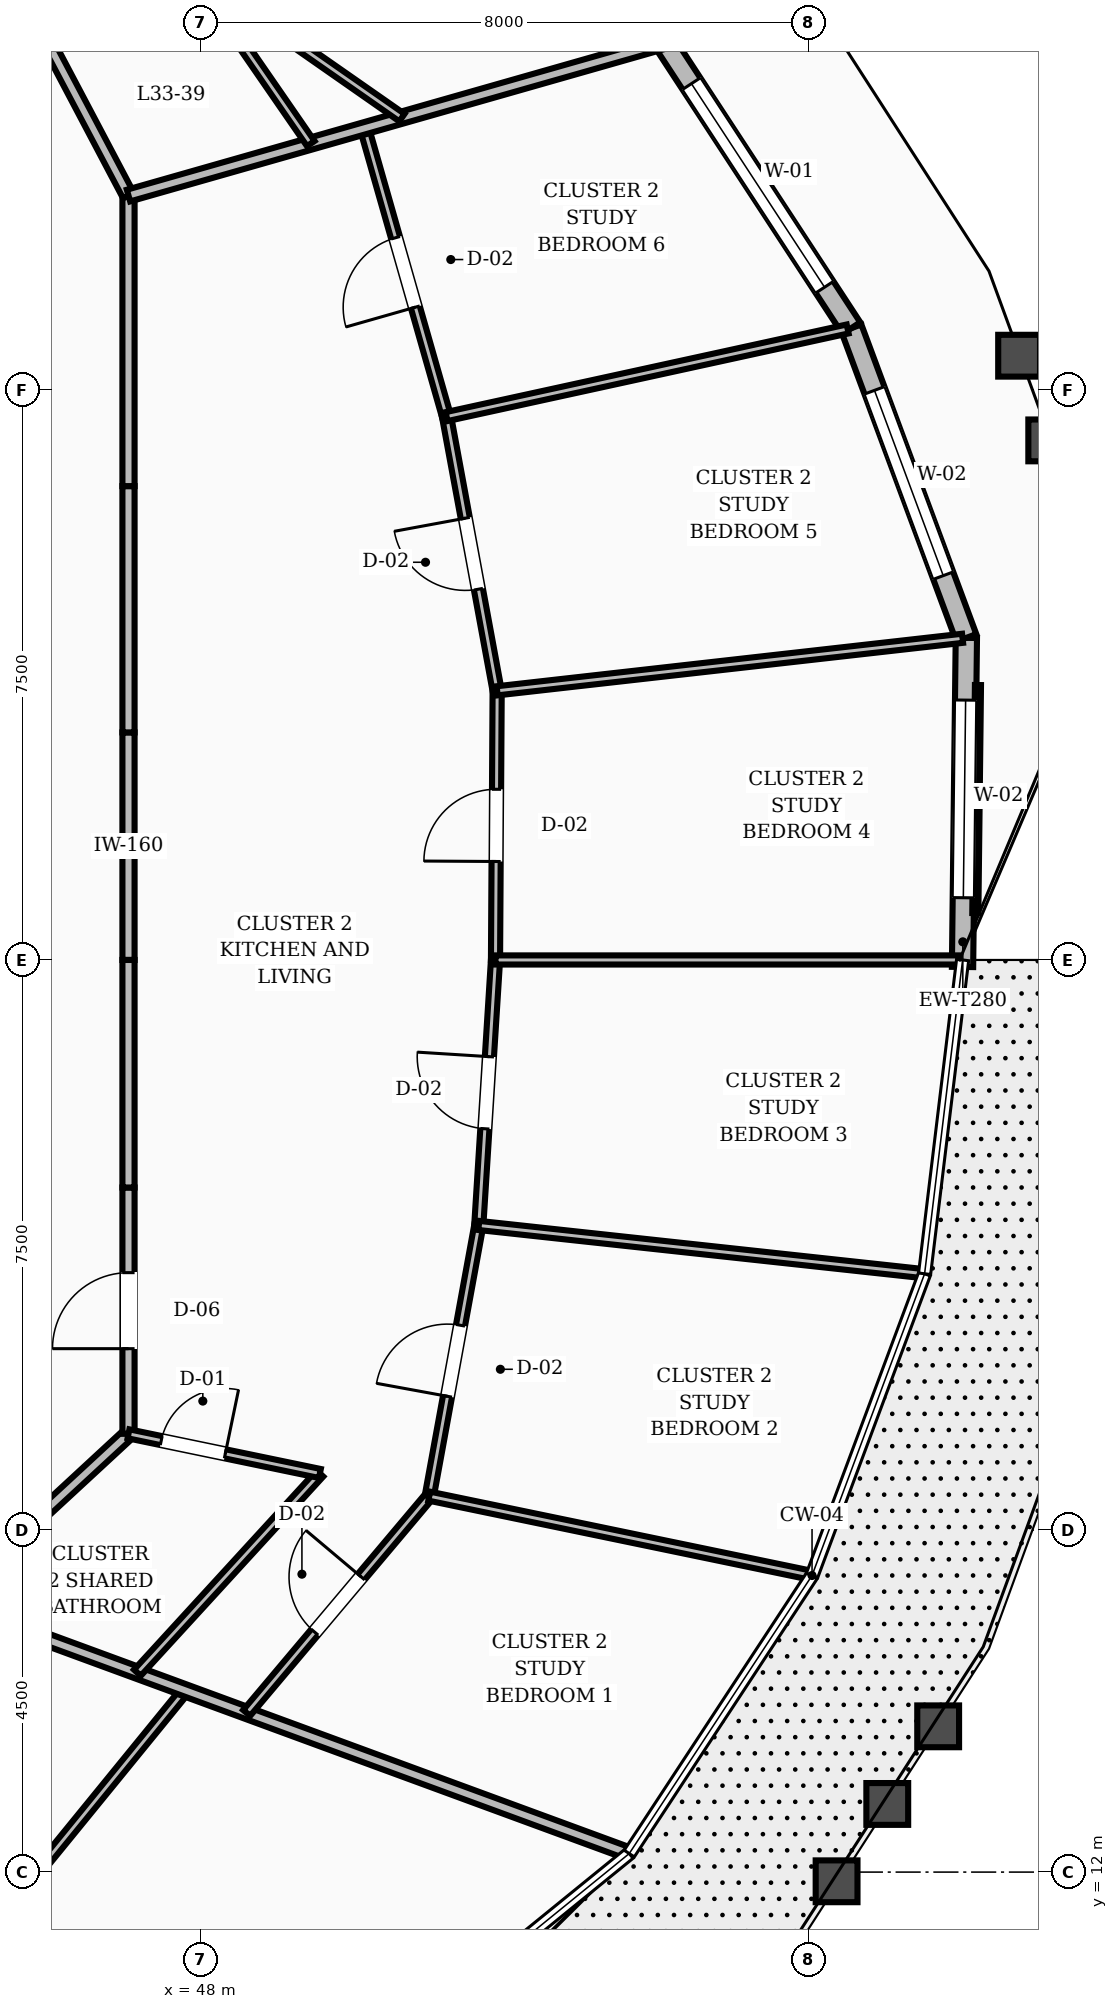
"""IFC4 building model, lengths in metres.
Left out: names, types, materials, properties, quantities, classifications, styles, units other than length and angle.
Written with IfcOpenShell. Run it as: python <this file> out.ifc"""

import sys

from ifc_helpers import new_model, si_unit, direction, frame, frame_2d, origin, place, context, subcontext, project, spatial, rectangle, extrude, element, fill, save


model = new_model("IFC4")
c1 = context("Model", 3, precision=1e-05, world=origin(), true_north=direction((0.0, 1.0)))
c2 = subcontext(c1, "Body", "Model", "MODEL_VIEW")
j1 = project(units=[si_unit("LENGTHUNIT", "METRE"), si_unit("PLANEANGLEUNIT", "RADIAN")], contexts=[c1])
p1 = place(None, origin())
s1 = spatial("IfcSite", under=j1, at=p1, CompositionType="ELEMENT")
p2 = place(p1, origin())
s2 = spatial("IfcBuilding", under=s1, at=p2, CompositionType="ELEMENT")
p3 = place(p2, frame((0.0, 0.0, 131.6)))
s3 = spatial("IfcBuildingStorey", under=s2, at=p3, CompositionType="ELEMENT", Elevation=131.6)
p4 = place(p3, frame((58.023, 23.908, 0.0), z_axis=(0.0, 0.0, 1.0), x_axis=(0.011615321034, 0.999932539883, 0.0)))
e1 = element("IfcWall", 1, at=p4, inside=s3, PredefinedType="STANDARD", context=c2, shape_type="SweptSolid", body=[
    extrude(rectangle(XDim=4.33, YDim=0.28, at=frame_2d((2.165, 0.0))), origin(), (0.0, 0.0, 1.0), 2.82),
])
p5 = place(p4, frame((0.911, 0.0, 0.8)))
e2 = element("IfcOpeningElement", 2, at=p5, cuts=e1, PredefinedType="OPENING", context=c2, shape_type="SweptSolid", body=[
    extrude(rectangle(XDim=2.6, YDim=1.65, at=frame_2d((1.3, 0.825))), frame((0.0, 0.15, 0.0), z_axis=(0.0, -1.0, 0.0), x_axis=(1.0, 0.0, 0.0)), (0.0, 0.0, 1.0), 0.3),
])
p6 = place(p3, frame((58.073, 28.238, 0.0), z_axis=(0.0, 0.0, 1.0), x_axis=(-0.348099086438, 0.937457746259, 0.0)))
e3 = element("IfcWall", 3, at=p6, inside=s3, PredefinedType="STANDARD", context=c2, shape_type="SweptSolid", body=[
    extrude(rectangle(XDim=4.346, YDim=0.28, at=frame_2d((2.173, 0.0))), origin(), (0.0, 0.0, 1.0), 2.82),
])
p7 = place(p6, frame((0.873, 0.0, 0.8)))
e4 = element("IfcOpeningElement", 4, at=p7, cuts=e3, PredefinedType="OPENING", context=c2, shape_type="SweptSolid", body=[
    extrude(rectangle(XDim=2.6, YDim=1.65, at=frame_2d((1.3, 0.825))), frame((0.0, 0.15, 0.0), z_axis=(0.0, -1.0, 0.0), x_axis=(1.0, 0.0, 0.0)), (0.0, 0.0, 1.0), 0.3),
])
p8 = place(p3, frame((56.56, 32.312, 0.0), z_axis=(0.0, 0.0, 1.0), x_axis=(-0.547422319482, 0.836856501518, 0.0)))
e5 = element("IfcWall", 5, at=p8, inside=s3, PredefinedType="STANDARD", context=c2, shape_type="SweptSolid", body=[
    extrude(rectangle(XDim=4.488, YDim=0.28, at=frame_2d((2.244, 0.0))), origin(), (0.0, 0.0, 1.0), 2.82),
])
p9 = place(p8, frame((0.644, 0.0, 0.8)))
e6 = element("IfcOpeningElement", 6, at=p9, cuts=e5, PredefinedType="OPENING", context=c2, shape_type="SweptSolid", body=[
    extrude(rectangle(XDim=3.2, YDim=1.65, at=frame_2d((1.6, 0.825))), frame((0.0, 0.15, 0.0), z_axis=(0.0, -1.0, 0.0), x_axis=(1.0, 0.0, 0.0)), (0.0, 0.0, 1.0), 0.3),
])
p10 = place(p3, frame((47.05, 24.0, 0.0), z_axis=(0.0, 0.0, 1.0), x_axis=(0.0, 1.0, 0.0)))
e7 = element("IfcWall", 7, at=p10, inside=s3, PredefinedType="SOLIDWALL", context=c2, shape_type="SweptSolid", body=[
    extrude(rectangle(XDim=2.994, YDim=0.16, at=frame_2d((1.497, 0.0))), origin(), (0.0, 0.0, 1.0), 2.8),
])
p11 = place(p3, frame((47.05, 26.994, 0.0), z_axis=(0.0, 0.0, 1.0), x_axis=(0.0, 1.0, 0.0)))
e8 = element("IfcWall", 8, at=p11, inside=s3, PredefinedType="SOLIDWALL", context=c2, shape_type="SweptSolid", body=[
    extrude(rectangle(XDim=3.24, YDim=0.16, at=frame_2d((1.62, 0.0))), origin(), (0.0, 0.0, 1.0), 2.8),
])
p12 = place(p3, frame((47.05, 30.234, 0.0), z_axis=(0.0, 0.0, 1.0), x_axis=(0.0, 1.0, 0.0)))
e9 = element("IfcWall", 9, at=p12, inside=s3, PredefinedType="SOLIDWALL", context=c2, shape_type="SweptSolid", body=[
    extrude(rectangle(XDim=3.822, YDim=0.16, at=frame_2d((1.911, 0.0))), origin(), (0.0, 0.0, 1.0), 2.8),
])
p13 = place(p3, frame((47.05, 34.056, 0.0), z_axis=(0.0, 0.0, 1.0), x_axis=(-0.466737093093, 0.884396113702, 0.0)))
e10 = element("IfcWall", 10, at=p13, inside=s3, PredefinedType="SOLIDWALL", context=c2, shape_type="SweptSolid", body=[
    extrude(rectangle(XDim=3.696, YDim=0.16, at=frame_2d((1.848, 0.0))), origin(), (0.0, 0.0, 1.0), 2.8),
])
p14 = place(p3, frame((44.65, 15.548, 0.0), z_axis=(0.0, 0.0, 1.0), x_axis=(0.734347936521, 0.678773237633, 0.0)))
e11 = element("IfcWall", 11, at=p14, inside=s3, PredefinedType="SOLIDWALL", context=c2, shape_type="SweptSolid", body=[
    extrude(rectangle(XDim=3.268, YDim=0.16, at=frame_2d((1.634, 0.0))), origin(), (0.0, 0.0, 1.0), 2.8),
])
p15 = place(p3, frame((47.05, 17.766, 0.0), z_axis=(0.0, 0.0, 1.0), x_axis=(0.0, 1.0, 0.0)))
e12 = element("IfcWall", 12, at=p15, inside=s3, PredefinedType="SOLIDWALL", context=c2, shape_type="SweptSolid", body=[
    extrude(rectangle(XDim=3.24, YDim=0.16, at=frame_2d((1.62, 0.0))), origin(), (0.0, 0.0, 1.0), 2.8),
])
p16 = place(p15, frame((1.12, 0.0, 0.0)))
e13 = element("IfcOpeningElement", 13, at=p16, cuts=e12, PredefinedType="OPENING", context=c2, shape_type="SweptSolid", body=[
    extrude(rectangle(XDim=1.0, YDim=2.1, at=frame_2d((0.5, 1.05))), frame((0.0, 0.09, 0.0), z_axis=(0.0, -1.0, 0.0), x_axis=(1.0, 0.0, 0.0)), (0.0, 0.0, 1.0), 0.18),
])
p17 = place(p3, frame((47.05, 21.006, 0.0), z_axis=(0.0, 0.0, 1.0), x_axis=(0.0, 1.0, 0.0)))
e14 = element("IfcWall", 14, at=p17, inside=s3, PredefinedType="SOLIDWALL", context=c2, shape_type="SweptSolid", body=[
    extrude(rectangle(XDim=2.994, YDim=0.16, at=frame_2d((1.497, 0.0))), origin(), (0.0, 0.0, 1.0), 2.8),
])
p18 = place(p3, frame((45.558, 11.646, 0.0), z_axis=(0.0, 0.0, 1.0), x_axis=(0.631780340891, 0.775147470397, 0.0)))
e15 = element("IfcWall", 15, at=p18, inside=s3, PredefinedType="PARTITIONING", context=c2, shape_type="SweptSolid", body=[
    extrude(rectangle(XDim=3.542, YDim=0.12, at=frame_2d((1.771, 0.0))), origin(), (0.0, 0.0, 1.0), 2.8),
])
p19 = place(p3, frame((44.65, 15.548, 0.0), z_axis=(0.0, 0.0, 1.0), x_axis=(0.938597960156, -0.345012853661, 0.0)))
e16 = element("IfcWall", 16, at=p19, inside=s3, PredefinedType="SOLIDWALL", context=c2, shape_type="SweptSolid", body=[
    extrude(rectangle(XDim=9.526, YDim=0.16, at=frame_2d((4.763, 0.0))), origin(), (0.0, 0.0, 1.0), 2.8),
])
p20 = place(p3, frame((47.167, 14.623, 0.0), z_axis=(0.0, 0.0, 1.0), x_axis=(0.675494490503, 0.737365033956, 0.0)))
e17 = element("IfcWall", 17, at=p20, inside=s3, PredefinedType="PARTITIONING", context=c2, shape_type="SweptSolid", body=[
    extrude(rectangle(XDim=3.555, YDim=0.12, at=frame_2d((1.778, 0.0))), origin(), (0.0, 0.0, 1.0), 2.8),
])
p21 = place(p3, frame((47.05, 17.766, 0.0), z_axis=(0.0, 0.0, 1.0), x_axis=(0.979183706755, -0.202976029188, 0.0)))
e18 = element("IfcWall", 18, at=p21, inside=s3, PredefinedType="PARTITIONING", context=c2, shape_type="SweptSolid", body=[
    extrude(rectangle(XDim=2.572, YDim=0.12, at=frame_2d((1.286, 0.0))), origin(), (0.0, 0.0, 1.0), 2.8),
])
p22 = place(p21, frame((0.44, 0.0, 0.0)))
e19 = element("IfcOpeningElement", 19, at=p22, cuts=e18, PredefinedType="OPENING", context=c2, shape_type="SweptSolid", body=[
    extrude(rectangle(XDim=0.86, YDim=2.1, at=frame_2d((0.43, 1.05))), frame((0.0, 0.07, 0.0), z_axis=(0.0, -1.0, 0.0), x_axis=(1.0, 0.0, 0.0)), (0.0, 0.0, 1.0), 0.14),
])
p23 = place(p3, frame((48.605, 14.094, 0.0), z_axis=(0.0, 0.0, 1.0), x_axis=(0.644194213793, 0.764861958078, 0.0)))
e20 = element("IfcWall", 20, at=p23, inside=s3, PredefinedType="PARTITIONING", context=c2, shape_type="SweptSolid", body=[
    extrude(rectangle(XDim=3.729, YDim=0.12, at=frame_2d((1.864, 0.0))), origin(), (0.0, 0.0, 1.0), 2.8),
])
p24 = place(p23, frame((1.389, 0.0, 0.0)))
e21 = element("IfcOpeningElement", 21, at=p24, cuts=e20, PredefinedType="OPENING", context=c2, shape_type="SweptSolid", body=[
    extrude(rectangle(XDim=0.95, YDim=2.1, at=frame_2d((0.475, 1.05))), frame((0.0, 0.07, 0.0), z_axis=(0.0, -1.0, 0.0), x_axis=(1.0, 0.0, 0.0)), (0.0, 0.0, 1.0), 0.14),
])
p25 = place(p3, frame((51.007, 16.946, 0.0), z_axis=(0.0, 0.0, 1.0), x_axis=(0.179995103125, 0.983667506249, 0.0)))
e22 = element("IfcWall", 22, at=p25, inside=s3, PredefinedType="PARTITIONING", context=c2, shape_type="SweptSolid", body=[
    extrude(rectangle(XDim=3.62, YDim=0.12, at=frame_2d((1.81, 0.0))), origin(), (0.0, 0.0, 1.0), 2.8),
])
p26 = place(p25, frame((1.335, 0.0, 0.0)))
e23 = element("IfcOpeningElement", 23, at=p26, cuts=e22, PredefinedType="OPENING", context=c2, shape_type="SweptSolid", body=[
    extrude(rectangle(XDim=0.95, YDim=2.1, at=frame_2d((0.475, 1.05))), frame((0.0, 0.07, 0.0), z_axis=(0.0, -1.0, 0.0), x_axis=(1.0, 0.0, 0.0)), (0.0, 0.0, 1.0), 0.14),
])
p27 = place(p3, frame((51.007, 16.946, 0.0), z_axis=(0.0, 0.0, 1.0), x_axis=(0.979186893487, -0.202960655359, 0.0)))
e24 = element("IfcWall", 24, at=p27, inside=s3, PredefinedType="PARTITIONING", context=c2, shape_type="SweptSolid", body=[
    extrude(rectangle(XDim=5.093, YDim=0.12, at=frame_2d((2.546, 0.0))), origin(), (0.0, 0.0, 1.0), 2.8),
])
p28 = place(p3, frame((51.658, 20.507, 0.0), z_axis=(0.0, 0.0, 1.0), x_axis=(0.062851654095, 0.998022880288, 0.0)))
e25 = element("IfcWall", 25, at=p28, inside=s3, PredefinedType="PARTITIONING", context=c2, shape_type="SweptSolid", body=[
    extrude(rectangle(XDim=3.5, YDim=0.12, at=frame_2d((1.75, 0.0))), origin(), (0.0, 0.0, 1.0), 2.8),
])
p29 = place(p28, frame((1.275, 0.0, 0.0)))
e26 = element("IfcOpeningElement", 26, at=p29, cuts=e25, PredefinedType="OPENING", context=c2, shape_type="SweptSolid", body=[
    extrude(rectangle(XDim=0.95, YDim=2.1, at=frame_2d((0.475, 1.05))), frame((0.0, 0.07, 0.0), z_axis=(0.0, -1.0, 0.0), x_axis=(1.0, 0.0, 0.0)), (0.0, 0.0, 1.0), 0.14),
])
p30 = place(p3, frame((51.658, 20.507, 0.0), z_axis=(0.0, 0.0, 1.0), x_axis=(0.994185813814, -0.107678073953, 0.0)))
e27 = element("IfcWall", 27, at=p30, inside=s3, PredefinedType="PARTITIONING", context=c2, shape_type="SweptSolid", body=[
    extrude(rectangle(XDim=5.85, YDim=0.12, at=frame_2d((2.925, 0.0))), origin(), (0.0, 0.0, 1.0), 2.8),
])
p31 = place(p3, frame((51.878, 24.0, 0.0), z_axis=(0.0, 0.0, 1.0), x_axis=(0.006136122757, 0.999981173822, 0.0)))
e28 = element("IfcWall", 28, at=p31, inside=s3, PredefinedType="PARTITIONING", context=c2, shape_type="SweptSolid", body=[
    extrude(rectangle(XDim=3.541, YDim=0.12, at=frame_2d((1.771, 0.0))), origin(), (0.0, 0.0, 1.0), 2.8),
])
p32 = place(p31, frame((1.295, 0.0, 0.0)))
e29 = element("IfcOpeningElement", 29, at=p32, cuts=e28, PredefinedType="OPENING", context=c2, shape_type="SweptSolid", body=[
    extrude(rectangle(XDim=0.95, YDim=2.1, at=frame_2d((0.475, 1.05))), frame((0.0, 0.07, 0.0), z_axis=(0.0, -1.0, 0.0), x_axis=(1.0, 0.0, 0.0)), (0.0, 0.0, 1.0), 0.14),
])
p33 = place(p3, frame((51.878, 24.0, 0.0), z_axis=(0.0, 0.0, 1.0), x_axis=(1.0, 0.0, 0.0)))
e30 = element("IfcWall", 30, at=p33, inside=s3, PredefinedType="PARTITIONING", context=c2, shape_type="SweptSolid", body=[
    extrude(rectangle(XDim=6.095, YDim=0.12, at=frame_2d((3.048, 0.0))), origin(), (0.0, 0.0, 1.0), 2.8),
])
p34 = place(p3, frame((51.9, 27.541, 0.0), z_axis=(0.0, 0.0, 1.0), x_axis=(-0.181502919565, 0.983390405785, 0.0)))
e31 = element("IfcWall", 31, at=p34, inside=s3, PredefinedType="PARTITIONING", context=c2, shape_type="SweptSolid", body=[
    extrude(rectangle(XDim=3.668, YDim=0.12, at=frame_2d((1.834, 0.0))), origin(), (0.0, 0.0, 1.0), 2.8),
])
p35 = place(p34, frame((1.359, 0.0, 0.0)))
e32 = element("IfcOpeningElement", 32, at=p35, cuts=e31, PredefinedType="OPENING", context=c2, shape_type="SweptSolid", body=[
    extrude(rectangle(XDim=0.95, YDim=2.1, at=frame_2d((0.475, 1.05))), frame((0.0, 0.07, 0.0), z_axis=(0.0, -1.0, 0.0), x_axis=(1.0, 0.0, 0.0)), (0.0, 0.0, 1.0), 0.14),
])
p36 = place(p3, frame((51.9, 27.541, 0.0), z_axis=(0.0, 0.0, 1.0), x_axis=(0.993693846481, 0.112127335947, 0.0)))
e33 = element("IfcWall", 33, at=p36, inside=s3, PredefinedType="PARTITIONING", context=c2, shape_type="SweptSolid", body=[
    extrude(rectangle(XDim=6.162, YDim=0.12, at=frame_2d((3.081, 0.0))), origin(), (0.0, 0.0, 1.0), 2.8),
])
p37 = place(p3, frame((51.234, 31.148, 0.0), z_axis=(0.0, 0.0, 1.0), x_axis=(-0.274058783109, 0.961712942307, 0.0)))
e34 = element("IfcWall", 34, at=p37, inside=s3, PredefinedType="PARTITIONING", context=c2, shape_type="SweptSolid", body=[
    extrude(rectangle(XDim=3.944, YDim=0.12, at=frame_2d((1.972, 0.0))), origin(), (0.0, 0.0, 1.0), 2.8),
])
p38 = place(p37, frame((1.497, 0.0, 0.0)))
e35 = element("IfcOpeningElement", 35, at=p38, cuts=e34, PredefinedType="OPENING", context=c2, shape_type="SweptSolid", body=[
    extrude(rectangle(XDim=0.95, YDim=2.1, at=frame_2d((0.475, 1.05))), frame((0.0, 0.07, 0.0), z_axis=(0.0, -1.0, 0.0), x_axis=(1.0, 0.0, 0.0)), (0.0, 0.0, 1.0), 0.14),
])
p39 = place(p3, frame((51.234, 31.148, 0.0), z_axis=(0.0, 0.0, 1.0), x_axis=(0.976938334756, 0.213521638447, 0.0)))
e36 = element("IfcWall", 36, at=p39, inside=s3, PredefinedType="PARTITIONING", context=c2, shape_type="SweptSolid", body=[
    extrude(rectangle(XDim=5.401, YDim=0.12, at=frame_2d((2.701, 0.0))), origin(), (0.0, 0.0, 1.0), 2.8),
])
p40 = place(p3, frame((47.05, 34.056, 0.0), z_axis=(0.0, 0.0, 1.0), x_axis=(0.961667991251, 0.274216473981, 0.0)))
e37 = element("IfcWall", 37, at=p40, inside=s3, PredefinedType="SOLIDWALL", context=c2, shape_type="SweptSolid", body=[
    extrude(rectangle(XDim=7.285, YDim=0.16, at=frame_2d((3.642, 0.0))), origin(), (0.0, 0.0, 1.0), 2.8),
])
p41 = place(p3, frame((49.448, 34.74, 0.0), z_axis=(0.0, 0.0, 1.0), x_axis=(-0.568195659841, 0.822893487723, 0.0)))
e38 = element("IfcWall", 38, at=p41, inside=s3, PredefinedType="PARTITIONING", context=c2, shape_type="SweptSolid", body=[
    extrude(rectangle(XDim=3.982, YDim=0.12, at=frame_2d((1.991, 0.0))), origin(), (0.0, 0.0, 1.0), 2.8),
])
p42 = place(p3, frame((50.647, 35.082, 0.0), z_axis=(0.0, 0.0, 1.0), x_axis=(-0.820068492929, 0.572265381537, 0.0)))
e39 = element("IfcWall", 39, at=p42, inside=s3, PredefinedType="PARTITIONING", context=c2, shape_type="SweptSolid", body=[
    extrude(rectangle(XDim=8.204, YDim=0.12, at=frame_2d((4.102, 0.0))), origin(), (0.0, 0.0, 1.0), 2.8),
])
p43 = place(p42, frame((5.029, 0.0, 0.0)))
e40 = element("IfcOpeningElement", 40, at=p43, cuts=e39, PredefinedType="OPENING", context=c2, shape_type="SweptSolid", body=[
    extrude(rectangle(XDim=0.95, YDim=2.1, at=frame_2d((0.475, 1.05))), frame((0.0, 0.07, 0.0), z_axis=(0.0, -1.0, 0.0), x_axis=(1.0, 0.0, 0.0)), (0.0, 0.0, 1.0), 0.14),
])
p44 = place(p5, origin())
e41 = element("IfcWindow", 41, at=p44, inside=s3, PartitioningType="SINGLE_PANEL", PredefinedType="WINDOW", context=c2, shape_type="SweptSolid", body=[
    extrude(rectangle(XDim=2.6, YDim=1.65, at=frame_2d((1.3, 0.825))), frame((0.0, 0.03, 0.0), z_axis=(0.0, -1.0, 0.0), x_axis=(1.0, 0.0, 0.0)), (0.0, 0.0, 1.0), 0.06),
])
fill(e2, e41)
p45 = place(p7, origin())
e42 = element("IfcWindow", 42, at=p45, inside=s3, PartitioningType="SINGLE_PANEL", PredefinedType="WINDOW", context=c2, shape_type="SweptSolid", body=[
    extrude(rectangle(XDim=2.6, YDim=1.65, at=frame_2d((1.3, 0.825))), frame((0.0, 0.03, 0.0), z_axis=(0.0, -1.0, 0.0), x_axis=(1.0, 0.0, 0.0)), (0.0, 0.0, 1.0), 0.06),
])
fill(e4, e42)
p46 = place(p9, origin())
e43 = element("IfcWindow", 43, at=p46, inside=s3, PartitioningType="SINGLE_PANEL", PredefinedType="WINDOW", context=c2, shape_type="SweptSolid", body=[
    extrude(rectangle(XDim=3.2, YDim=1.65, at=frame_2d((1.6, 0.825))), frame((0.0, 0.03, 0.0), z_axis=(0.0, -1.0, 0.0), x_axis=(1.0, 0.0, 0.0)), (0.0, 0.0, 1.0), 0.06),
])
fill(e6, e43)
p47 = place(p22, origin())
e44 = element("IfcDoor", 44, at=p47, inside=s3, OperationType="SINGLE_SWING_RIGHT", PredefinedType="DOOR", context=c2, shape_type="SweptSolid", body=[
    extrude(rectangle(XDim=0.86, YDim=2.1, at=frame_2d((0.43, 1.05))), frame((0.0, 0.025, 0.0), z_axis=(0.0, -1.0, 0.0), x_axis=(1.0, 0.0, 0.0)), (0.0, 0.0, 1.0), 0.05),
])
fill(e19, e44)
p48 = place(p16, origin())
e45 = element("IfcDoor", 45, at=p48, inside=s3, OperationType="SINGLE_SWING_LEFT", PredefinedType="DOOR", context=c2, shape_type="SweptSolid", body=[
    extrude(rectangle(XDim=1.0, YDim=2.1, at=frame_2d((0.5, 1.05))), frame((0.0, 0.025, 0.0), z_axis=(0.0, -1.0, 0.0), x_axis=(1.0, 0.0, 0.0)), (0.0, 0.0, 1.0), 0.05),
])
fill(e13, e45)
p49 = place(p24, origin())
e46 = element("IfcDoor", 46, at=p49, inside=s3, OperationType="SINGLE_SWING_RIGHT", PredefinedType="DOOR", context=c2, shape_type="SweptSolid", body=[
    extrude(rectangle(XDim=0.95, YDim=2.1, at=frame_2d((0.475, 1.05))), frame((0.0, 0.025, 0.0), z_axis=(0.0, -1.0, 0.0), x_axis=(1.0, 0.0, 0.0)), (0.0, 0.0, 1.0), 0.05),
])
fill(e21, e46)
p50 = place(p26, origin())
e47 = element("IfcDoor", 47, at=p50, inside=s3, OperationType="SINGLE_SWING_LEFT", PredefinedType="DOOR", context=c2, shape_type="SweptSolid", body=[
    extrude(rectangle(XDim=0.95, YDim=2.1, at=frame_2d((0.475, 1.05))), frame((0.0, 0.025, 0.0), z_axis=(0.0, -1.0, 0.0), x_axis=(1.0, 0.0, 0.0)), (0.0, 0.0, 1.0), 0.05),
])
fill(e23, e47)
p51 = place(p29, origin())
e48 = element("IfcDoor", 48, at=p51, inside=s3, OperationType="SINGLE_SWING_RIGHT", PredefinedType="DOOR", context=c2, shape_type="SweptSolid", body=[
    extrude(rectangle(XDim=0.95, YDim=2.1, at=frame_2d((0.475, 1.05))), frame((0.0, 0.025, 0.0), z_axis=(0.0, -1.0, 0.0), x_axis=(1.0, 0.0, 0.0)), (0.0, 0.0, 1.0), 0.05),
])
fill(e26, e48)
p52 = place(p32, origin())
e49 = element("IfcDoor", 49, at=p52, inside=s3, OperationType="SINGLE_SWING_LEFT", PredefinedType="DOOR", context=c2, shape_type="SweptSolid", body=[
    extrude(rectangle(XDim=0.95, YDim=2.1, at=frame_2d((0.475, 1.05))), frame((0.0, 0.025, 0.0), z_axis=(0.0, -1.0, 0.0), x_axis=(1.0, 0.0, 0.0)), (0.0, 0.0, 1.0), 0.05),
])
fill(e29, e49)
p53 = place(p35, origin())
e50 = element("IfcDoor", 50, at=p53, inside=s3, OperationType="SINGLE_SWING_RIGHT", PredefinedType="DOOR", context=c2, shape_type="SweptSolid", body=[
    extrude(rectangle(XDim=0.95, YDim=2.1, at=frame_2d((0.475, 1.05))), frame((0.0, 0.025, 0.0), z_axis=(0.0, -1.0, 0.0), x_axis=(1.0, 0.0, 0.0)), (0.0, 0.0, 1.0), 0.05),
])
fill(e32, e50)
p54 = place(p38, origin())
e51 = element("IfcDoor", 51, at=p54, inside=s3, OperationType="SINGLE_SWING_LEFT", PredefinedType="DOOR", context=c2, shape_type="SweptSolid", body=[
    extrude(rectangle(XDim=0.95, YDim=2.1, at=frame_2d((0.475, 1.05))), frame((0.0, 0.025, 0.0), z_axis=(0.0, -1.0, 0.0), x_axis=(1.0, 0.0, 0.0)), (0.0, 0.0, 1.0), 0.05),
])
fill(e35, e51)
save(model, sys.argv[1])
